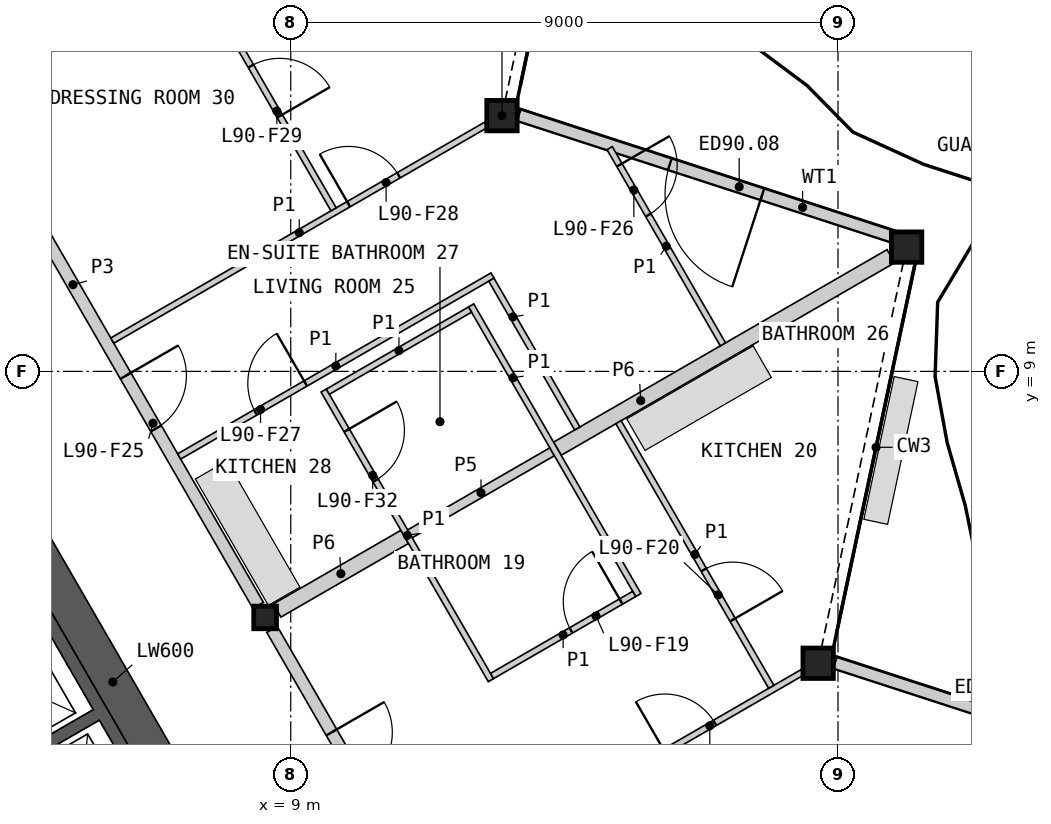
"""IFC4 building model, lengths in metres.
Left out: names, types, materials, properties, quantities, classifications, styles, units other than length and angle.
Written with IfcOpenShell. Run it as: python <this file> out.ifc"""

import sys

from ifc_helpers import new_model, si_unit, direction, frame, frame_2d, origin, origin_2d, place, context, subcontext, project, spatial, polyline, rectangle, hollow_rectangle, i_section, outline, extrude, element, fill, save


model = new_model("IFC4")
c1 = context("Model", 3, precision=1e-05, world=origin(), true_north=direction((0.0, 1.0)))
c2 = subcontext(c1, "Body", "Model", "MODEL_VIEW")
j1 = project(units=[si_unit("LENGTHUNIT", "METRE"), si_unit("PLANEANGLEUNIT", "RADIAN")], contexts=[c1])
p1 = place(None, origin())
s1 = spatial("IfcSite", under=j1, at=p1, CompositionType="ELEMENT")
p2 = place(p1, origin())
s2 = spatial("IfcBuilding", under=s1, at=p2, CompositionType="ELEMENT")
p3 = place(p2, frame((0.0, 0.0, 395.0)))
s3 = spatial("IfcBuildingStorey", under=s2, at=p3, CompositionType="ELEMENT", Elevation=395.0)
for number, where, z_axis, x_axis in (
    (1, (17.674, 4.199, 0.0), (0.0, 0.0, 1.0), (1.0, 0.0, 0.0)),
    (2, (19.129, 11.044, 0.0), (0.0, 0.0, 1.0), (1.0, 0.0, 0.0)),
    (3, (12.474, 13.206, 0.0), (0.0, 0.0, 1.0), (1.0, 0.0, 0.0)),
):
    element("IfcColumn", number, at=place(p3, frame(where, z_axis=z_axis, x_axis=x_axis)), inside=s3, PredefinedType="COLUMN", context=c2, shape_type="SweptSolid", body=[
        extrude(hollow_rectangle(XDim=0.5, YDim=0.5, WallThickness=0.03, at=origin_2d()), origin(), (0.0, 0.0, 1.0), 3.4),
    ])
p4 = place(p3, frame((8.578, 4.953, 0.0), z_axis=(0.0, 0.0, 1.0), x_axis=(1.0, 0.0, 0.0)))
e4 = element("IfcColumn", 4, at=p4, inside=s3, PredefinedType="COLUMN", context=c2, shape_type="SweptSolid", body=[
    extrude(i_section(OverallWidth=0.374, OverallDepth=0.372, WebThickness=0.016, FlangeThickness=0.026, at=origin_2d()), origin(), (0.0, 0.0, 1.0), 3.4),
])
p5 = place(p3, frame((24.174, 2.185, 0.0), z_axis=(0.0, 0.0, 1.0), x_axis=(-0.951061473407, 0.309001737536, 0.0)))
e5 = element("IfcWall", 5, at=p5, inside=s3, PredefinedType="SOLIDWALL", context=c2, shape_type="SweptSolid", body=[
    extrude(rectangle(XDim=6.546, YDim=0.2, at=frame_2d((3.273, 0.0))), origin(), (0.0, 0.0, 1.0), 2.634),
])
p6 = place(p5, frame((2.333, 0.0, 0.0)))
e6 = element("IfcOpeningElement", 6, at=p6, cuts=e5, PredefinedType="OPENING", context=c2, shape_type="SweptSolid", body=[
    extrude(rectangle(XDim=1.6, YDim=2.25, at=frame_2d((0.8, 1.125))), frame((0.0, 0.11, 0.0), z_axis=(0.0, -1.0, 0.0), x_axis=(1.0, 0.0, 0.0)), (0.0, 0.0, 1.0), 0.22),
])
p7 = place(p3, frame((18.974, 11.191, 0.0), z_axis=(0.0, 0.0, 1.0), x_axis=(-0.951057912068, 0.309012698595, 0.0)))
e7 = element("IfcWall", 7, at=p7, inside=s3, PredefinedType="SOLIDWALL", context=c2, shape_type="SweptSolid", body=[
    extrude(rectangle(XDim=6.546, YDim=0.2, at=frame_2d((3.273, 0.0))), origin(), (0.0, 0.0, 1.0), 2.634),
])
p8 = place(p7, frame((2.333, 0.0, 0.0)))
e8 = element("IfcOpeningElement", 8, at=p8, cuts=e7, PredefinedType="OPENING", context=c2, shape_type="SweptSolid", body=[
    extrude(rectangle(XDim=1.6, YDim=2.25, at=frame_2d((0.8, 1.125))), frame((0.0, 0.11, 0.0), z_axis=(0.0, -1.0, 0.0), x_axis=(1.0, 0.0, 0.0)), (0.0, 0.0, 1.0), 0.22),
])
p9 = place(p3, origin())
e9 = element("IfcWall", 9, at=p9, inside=s3, PredefinedType="SHEAR", context=c2, shape_type="SweptSolid", body=[
    extrude(outline(polyline([(1.561, 6.097), (3.731, 7.35), (8.231, -0.444), (6.061, -1.697), (5.96, -1.524), (7.952, -0.374), (6.952, 1.358), (4.96, 0.208), (4.861, 0.381), (6.852, 1.531), (5.852, 3.263), (3.861, 2.113), (3.76, 2.287), (5.752, 3.437), (4.752, 5.169), (2.76, 4.019), (2.66, 4.192), (4.652, 5.342), (3.652, 7.074), (1.66, 5.924), (1.561, 6.097)])), origin(), (0.0, 0.0, 1.0), 3.1),
])
p10 = place(p3, frame((5.817, -1.476, 0.0), z_axis=(0.0, 0.0, 1.0), x_axis=(-0.500002616675, 0.866023893041, 0.0)))
e10 = element("IfcWall", 10, at=p10, inside=s3, PredefinedType="SOLIDWALL", context=c2, shape_type="SweptSolid", body=[
    extrude(rectangle(XDim=8.373, YDim=0.2, at=frame_2d((4.187, 0.0))), origin(), (0.0, 0.0, 1.0), 3.1),
])
p11 = place(p10, frame((0.337, 0.0, 0.0)))
e11 = element("IfcOpeningElement", 11, at=p11, cuts=e10, PredefinedType="OPENING", context=c2, shape_type="SweptSolid", body=[
    extrude(rectangle(XDim=1.1, YDim=2.1, at=frame_2d((0.55, 1.05))), frame((0.0, 0.11, 0.0), z_axis=(0.0, -1.0, 0.0), x_axis=(1.0, 0.0, 0.0)), (0.0, 0.0, 1.0), 0.22),
])
p12 = place(p10, frame((2.537, 0.0, 0.0)))
e12 = element("IfcOpeningElement", 12, at=p12, cuts=e10, PredefinedType="OPENING", context=c2, shape_type="SweptSolid", body=[
    extrude(rectangle(XDim=1.1, YDim=2.1, at=frame_2d((0.55, 1.05))), frame((0.0, 0.11, 0.0), z_axis=(0.0, -1.0, 0.0), x_axis=(1.0, 0.0, 0.0)), (0.0, 0.0, 1.0), 0.22),
])
p13 = place(p10, frame((4.737, 0.0, 0.0)))
e13 = element("IfcOpeningElement", 13, at=p13, cuts=e10, PredefinedType="OPENING", context=c2, shape_type="SweptSolid", body=[
    extrude(rectangle(XDim=1.1, YDim=2.1, at=frame_2d((0.55, 1.05))), frame((0.0, 0.11, 0.0), z_axis=(0.0, -1.0, 0.0), x_axis=(1.0, 0.0, 0.0)), (0.0, 0.0, 1.0), 0.22),
])
p14 = place(p10, frame((7.037, 0.0, 0.0)))
e14 = element("IfcOpeningElement", 14, at=p14, cuts=e10, PredefinedType="OPENING", context=c2, shape_type="SweptSolid", body=[
    extrude(rectangle(XDim=0.9, YDim=2.1, at=frame_2d((0.45, 1.05))), frame((0.0, 0.11, 0.0), z_axis=(0.0, -1.0, 0.0), x_axis=(1.0, 0.0, 0.0)), (0.0, 0.0, 1.0), 0.22),
])
p15 = place(p3, frame((8.686, -0.634, 0.0), z_axis=(0.0, 0.0, 1.0), x_axis=(-0.50001836461, 0.866014800712, 0.0)))
e15 = element("IfcWall", 15, at=p15, inside=s3, PredefinedType="SHEAR", context=c2, shape_type="SweptSolid", body=[
    extrude(rectangle(XDim=10.451, YDim=0.6, at=frame_2d((5.225, 0.0))), origin(), (0.0, 0.0, 1.0), 3.1),
])
p16 = place(p3, frame((4.403, 12.185, 0.0), z_axis=(0.0, 0.0, 1.0), x_axis=(0.499992155518, -0.866029932751, 0.0)))
e16 = element("IfcWall", 16, at=p16, inside=s3, PredefinedType="PARTITIONING", context=c2, shape_type="SweptSolid", body=[
    extrude(rectangle(XDim=8.123, YDim=0.2, at=frame_2d((4.062, 0.0))), origin(), (0.0, 0.0, 1.0), 3.1),
])
p17 = place(p16, frame((3.762, 0.0, 0.0)))
e17 = element("IfcOpeningElement", 17, at=p17, cuts=e16, PredefinedType="OPENING", context=c2, shape_type="SweptSolid", body=[
    extrude(rectangle(XDim=1.0, YDim=2.1, at=frame_2d((0.5, 1.05))), frame((0.0, 0.11, 0.0), z_axis=(0.0, -1.0, 0.0), x_axis=(1.0, 0.0, 0.0)), (0.0, 0.0, 1.0), 0.22),
])
p18 = place(p3, frame((8.692, 4.756, 0.0), z_axis=(0.0, 0.0, 1.0), x_axis=(0.500001682468, -0.866024432409, 0.0)))
e18 = element("IfcWall", 18, at=p18, inside=s3, PredefinedType="PARTITIONING", context=c2, shape_type="SweptSolid", body=[
    extrude(rectangle(XDim=8.124, YDim=0.2, at=frame_2d((4.062, 0.0))), origin(), (0.0, 0.0, 1.0), 3.1),
])
p19 = place(p18, frame((1.956, 0.0, 0.0)))
e19 = element("IfcOpeningElement", 19, at=p19, cuts=e18, PredefinedType="OPENING", context=c2, shape_type="SweptSolid", body=[
    extrude(rectangle(XDim=1.0, YDim=2.1, at=frame_2d((0.5, 1.05))), frame((0.0, 0.11, 0.0), z_axis=(0.0, -1.0, 0.0), x_axis=(1.0, 0.0, 0.0)), (0.0, 0.0, 1.0), 0.22),
])
p20 = place(p3, frame((13.385, 7.728, 0.0), z_axis=(0.0, 0.0, 1.0), x_axis=(0.866023139795, 0.500003921324, 0.0)))
e20 = element("IfcWall", 20, at=p20, inside=s3, PredefinedType="PARTITIONING", context=c2, shape_type="SweptSolid", body=[
    extrude(rectangle(XDim=6.332, YDim=0.25, at=frame_2d((3.166, 0.0))), origin(), (0.0, 0.0, 1.0), 2.33),
])
p21 = place(p3, frame((8.775, 5.066, 0.0), z_axis=(0.0, 0.0, 1.0), x_axis=(0.865989219354, 0.500062668036, 0.0)))
e21 = element("IfcWall", 21, at=p21, inside=s3, PredefinedType="PARTITIONING", context=c2, shape_type="SweptSolid", body=[
    extrude(rectangle(XDim=2.423, YDim=0.25, at=frame_2d((1.211, 0.0))), origin(), (0.0, 0.0, 1.0), 2.33),
])
p22 = place(p3, frame((10.96, 6.328, 0.0), z_axis=(0.0, 0.0, 1.0), x_axis=(0.866059108428, 0.4999416173, 0.0)))
e22 = element("IfcWall", 22, at=p22, inside=s3, PredefinedType="PLUMBINGWALL", context=c2, shape_type="SweptSolid", body=[
    extrude(rectangle(XDim=2.7, YDim=0.15, at=frame_2d((1.35, 0.0))), origin(), (0.0, 0.0, 1.0), 2.33),
])
p23 = place(p3, frame((3.465, 14.01, 0.0), z_axis=(0.0, 0.0, 1.0), x_axis=(0.866032376801, 0.499987922186, 0.0)))
e23 = element("IfcWall", 23, at=p23, inside=s3, PredefinedType="PARTITIONING", context=c2, shape_type="SweptSolid", body=[
    extrude(rectangle(XDim=11.782, YDim=0.1, at=frame_2d((5.891, 0.0))), origin(), (0.0, 0.0, 1.0), 2.33),
])
p24 = place(p23, frame((6.168, 0.0, 0.0)))
e24 = element("IfcOpeningElement", 24, at=p24, cuts=e23, PredefinedType="OPENING", context=c2, shape_type="SweptSolid", body=[
    extrude(rectangle(XDim=0.95, YDim=2.1, at=frame_2d((0.475, 1.05))), frame((0.0, 0.06, 0.0), z_axis=(0.0, -1.0, 0.0), x_axis=(1.0, 0.0, 0.0)), (0.0, 0.0, 1.0), 0.12),
])
p25 = place(p3, frame((6.065, 9.506, 0.0), z_axis=(0.0, 0.0, 1.0), x_axis=(0.866018949465, 0.500011179042, 0.0)))
e25 = element("IfcWall", 25, at=p25, inside=s3, PredefinedType="PARTITIONING", context=c2, shape_type="SweptSolid", body=[
    extrude(rectangle(XDim=7.1, YDim=0.1, at=frame_2d((3.55, 0.0))), origin(), (0.0, 0.0, 1.0), 2.33),
])
p26 = place(p25, frame((4.488, 0.0, 0.0)))
e26 = element("IfcOpeningElement", 26, at=p26, cuts=e25, PredefinedType="OPENING", context=c2, shape_type="SweptSolid", body=[
    extrude(rectangle(XDim=0.95, YDim=2.1, at=frame_2d((0.475, 1.05))), frame((0.0, 0.06, 0.0), z_axis=(0.0, -1.0, 0.0), x_axis=(1.0, 0.0, 0.0)), (0.0, 0.0, 1.0), 0.12),
])
p27 = place(p3, frame((11.265, 0.5, 0.0), z_axis=(0.0, 0.0, 1.0), x_axis=(0.866033839264, 0.499985389037, 0.0)))
e27 = element("IfcWall", 27, at=p27, inside=s3, PredefinedType="PARTITIONING", context=c2, shape_type="SweptSolid", body=[
    extrude(rectangle(XDim=7.1, YDim=0.1, at=frame_2d((3.55, 0.0))), origin(), (0.0, 0.0, 1.0), 2.33),
])
p28 = place(p27, frame((4.488, 0.0, 0.0)))
e28 = element("IfcOpeningElement", 28, at=p28, cuts=e27, PredefinedType="OPENING", context=c2, shape_type="SweptSolid", body=[
    extrude(rectangle(XDim=0.95, YDim=2.1, at=frame_2d((0.475, 1.05))), frame((0.0, 0.06, 0.0), z_axis=(0.0, -1.0, 0.0), x_axis=(1.0, 0.0, 0.0)), (0.0, 0.0, 1.0), 0.12),
])
p29 = place(p3, frame((7.165, 7.601, 0.0), z_axis=(0.0, 0.0, 1.0), x_axis=(0.866017493347, 0.500013701029, 0.0)))
e29 = element("IfcWall", 29, at=p29, inside=s3, PredefinedType="PARTITIONING", context=c2, shape_type="SweptSolid", body=[
    extrude(rectangle(XDim=5.95, YDim=0.1, at=frame_2d((2.975, 0.0))), origin(), (0.0, 0.0, 1.0), 2.33),
])
p30 = place(p29, frame((1.45, 0.0, 0.0)))
e30 = element("IfcOpeningElement", 30, at=p30, cuts=e29, PredefinedType="OPENING", context=c2, shape_type="SweptSolid", body=[
    extrude(rectangle(XDim=0.95, YDim=2.1, at=frame_2d((0.475, 1.05))), frame((0.0, 0.06, 0.0), z_axis=(0.0, -1.0, 0.0), x_axis=(1.0, 0.0, 0.0)), (0.0, 0.0, 1.0), 0.12),
])
p31 = place(p3, frame((11.967, 10.084, 0.0), z_axis=(0.0, 0.0, 1.0), x_axis=(0.500015767406, -0.866016300277, 0.0)))
e31 = element("IfcWall", 31, at=p31, inside=s3, PredefinedType="PARTITIONING", context=c2, shape_type="SweptSolid", body=[
    extrude(rectangle(XDim=5.5, YDim=0.1, at=frame_2d((2.75, 0.0))), origin(), (0.0, 0.0, 1.0), 2.33),
])
p32 = place(p3, frame((9.542, 8.684, 0.0), z_axis=(0.0, 0.0, 1.0), x_axis=(0.499996545922, -0.866027397988, 0.0)))
e32 = element("IfcWall", 32, at=p32, inside=s3, PredefinedType="PARTITIONING", context=c2, shape_type="SweptSolid", body=[
    extrude(rectangle(XDim=5.5, YDim=0.1, at=frame_2d((2.75, 0.0))), origin(), (0.0, 0.0, 1.0), 2.33),
])
p33 = place(p32, frame((0.756, 0.0, 0.0)))
e33 = element("IfcOpeningElement", 33, at=p33, cuts=e32, PredefinedType="OPENING", context=c2, shape_type="SweptSolid", body=[
    extrude(rectangle(XDim=0.95, YDim=2.1, at=frame_2d((0.475, 1.05))), frame((0.0, 0.06, 0.0), z_axis=(0.0, -1.0, 0.0), x_axis=(1.0, 0.0, 0.0)), (0.0, 0.0, 1.0), 0.12),
])
p34 = place(p3, frame((14.39, 8.164, 0.0), z_axis=(0.0, 0.0, 1.0), x_axis=(0.499990214365, -0.86603105345, 0.0)))
e34 = element("IfcWall", 34, at=p34, inside=s3, PredefinedType="PARTITIONING", context=c2, shape_type="SweptSolid", body=[
    extrude(rectangle(XDim=5.025, YDim=0.1, at=frame_2d((2.512, 0.0))), origin(), (0.0, 0.0, 1.0), 2.33),
])
p35 = place(p34, frame((2.803, 0.0, 0.0)))
e35 = element("IfcOpeningElement", 35, at=p35, cuts=e34, PredefinedType="OPENING", context=c2, shape_type="SweptSolid", body=[
    extrude(rectangle(XDim=0.95, YDim=2.1, at=frame_2d((0.475, 1.05))), frame((0.0, 0.06, 0.0), z_axis=(0.0, -1.0, 0.0), x_axis=(1.0, 0.0, 0.0)), (0.0, 0.0, 1.0), 0.12),
])
p36 = place(p3, frame((7.154, 16.082, 0.0), z_axis=(0.0, 0.0, 1.0), x_axis=(0.499984882974, -0.866034131428, 0.0)))
e36 = element("IfcWall", 36, at=p36, inside=s3, PredefinedType="PARTITIONING", context=c2, shape_type="SweptSolid", body=[
    extrude(rectangle(XDim=5.1, YDim=0.1, at=frame_2d((2.55, 0.0))), origin(), (0.0, 0.0, 1.0), 2.33),
])
p37 = place(p36, frame((2.379, 0.0, 0.0)))
e37 = element("IfcOpeningElement", 37, at=p37, cuts=e36, PredefinedType="OPENING", context=c2, shape_type="SweptSolid", body=[
    extrude(rectangle(XDim=0.95, YDim=2.1, at=frame_2d((0.475, 1.05))), frame((0.0, 0.06, 0.0), z_axis=(0.0, -1.0, 0.0), x_axis=(1.0, 0.0, 0.0)), (0.0, 0.0, 1.0), 0.12),
])
p38 = place(p3, frame((14.244, 12.672, 0.0), z_axis=(0.0, 0.0, 1.0), x_axis=(0.500021098671, -0.866013222118, 0.0)))
e38 = element("IfcWall", 38, at=p38, inside=s3, PredefinedType="PARTITIONING", context=c2, shape_type="SweptSolid", body=[
    extrude(rectangle(XDim=3.727, YDim=0.1, at=frame_2d((1.863, 0.0))), origin(), (0.0, 0.0, 1.0), 2.33),
])
p39 = place(p38, frame((0.321, 0.0, 0.0)))
e39 = element("IfcOpeningElement", 39, at=p39, cuts=e38, PredefinedType="OPENING", context=c2, shape_type="SweptSolid", body=[
    extrude(rectangle(XDim=0.95, YDim=2.1, at=frame_2d((0.475, 1.05))), frame((0.0, 0.06, 0.0), z_axis=(0.0, -1.0, 0.0), x_axis=(1.0, 0.0, 0.0)), (0.0, 0.0, 1.0), 0.12),
])
p40 = place(p3, frame((12.3, 10.508, 0.0), z_axis=(0.0, 0.0, 1.0), x_axis=(0.500024172624, -0.866011447264, 0.0)))
e40 = element("IfcWall", 40, at=p40, inside=s3, PredefinedType="PARTITIONING", context=c2, shape_type="SweptSolid", body=[
    extrude(rectangle(XDim=2.825, YDim=0.1, at=frame_2d((1.413, 0.0))), origin(), (0.0, 0.0, 1.0), 2.33),
])
p41 = place(p3, frame((9.61, 8.666, 0.0), z_axis=(0.0, 0.0, 1.0), x_axis=(0.86599734893, 0.500048589285, 0.0)))
e41 = element("IfcWall", 41, at=p41, inside=s3, PredefinedType="PARTITIONING", context=c2, shape_type="SweptSolid", body=[
    extrude(rectangle(XDim=2.7, YDim=0.1, at=frame_2d((1.35, 0.0))), origin(), (0.0, 0.0, 1.0), 2.33),
])
p42 = place(p3, frame((12.31, 3.99, 0.0), z_axis=(0.0, 0.0, 1.0), x_axis=(0.86599734893, 0.500048589285, 0.0)))
e42 = element("IfcWall", 42, at=p42, inside=s3, PredefinedType="PARTITIONING", context=c2, shape_type="SweptSolid", body=[
    extrude(rectangle(XDim=2.7, YDim=0.1, at=frame_2d((1.35, 0.0))), origin(), (0.0, 0.0, 1.0), 2.33),
])
p43 = place(p42, frame((1.5, 0.0, 0.0)))
e43 = element("IfcOpeningElement", 43, at=p43, cuts=e42, PredefinedType="OPENING", context=c2, shape_type="SweptSolid", body=[
    extrude(rectangle(XDim=0.95, YDim=2.1, at=frame_2d((0.475, 1.05))), frame((0.0, 0.06, 0.0), z_axis=(0.0, -1.0, 0.0), x_axis=(1.0, 0.0, 0.0)), (0.0, 0.0, 1.0), 0.12),
])
p44 = place(p8, origin())
e44 = element("IfcDoor", 44, at=p44, inside=s3, OperationType="DOUBLE_DOOR_SINGLE_SWING", PredefinedType="DOOR", context=c2, shape_type="SweptSolid", body=[
    extrude(rectangle(XDim=1.6, YDim=2.25, at=frame_2d((0.8, 1.125))), frame((0.0, 0.025, 0.0), z_axis=(0.0, -1.0, 0.0), x_axis=(1.0, 0.0, 0.0)), (0.0, 0.0, 1.0), 0.05),
])
fill(e8, e44)
p45 = place(p19, origin())
e45 = element("IfcDoor", 45, at=p45, inside=s3, OperationType="SINGLE_SWING_LEFT", PredefinedType="DOOR", context=c2, shape_type="SweptSolid", body=[
    extrude(rectangle(XDim=1.0, YDim=2.1, at=frame_2d((0.5, 1.05))), frame((0.0, 0.025, 0.0), z_axis=(0.0, -1.0, 0.0), x_axis=(1.0, 0.0, 0.0)), (0.0, 0.0, 1.0), 0.05),
])
fill(e19, e45)
p46 = place(p43, origin())
e46 = element("IfcDoor", 46, at=p46, inside=s3, OperationType="SINGLE_SWING_RIGHT", PredefinedType="DOOR", context=c2, shape_type="SweptSolid", body=[
    extrude(rectangle(XDim=0.95, YDim=2.1, at=frame_2d((0.475, 1.05))), frame((0.0, 0.025, 0.0), z_axis=(0.0, -1.0, 0.0), x_axis=(1.0, 0.0, 0.0)), (0.0, 0.0, 1.0), 0.05),
])
fill(e43, e46)
p47 = place(p35, origin())
e47 = element("IfcDoor", 47, at=p47, inside=s3, OperationType="SINGLE_SWING_RIGHT", PredefinedType="DOOR", context=c2, shape_type="SweptSolid", body=[
    extrude(rectangle(XDim=0.95, YDim=2.1, at=frame_2d((0.475, 1.05))), frame((0.0, 0.025, 0.0), z_axis=(0.0, -1.0, 0.0), x_axis=(1.0, 0.0, 0.0)), (0.0, 0.0, 1.0), 0.05),
])
fill(e35, e47)
p48 = place(p28, origin())
e48 = element("IfcDoor", 48, at=p48, inside=s3, OperationType="SINGLE_SWING_LEFT", PredefinedType="DOOR", context=c2, shape_type="SweptSolid", body=[
    extrude(rectangle(XDim=0.95, YDim=2.1, at=frame_2d((0.475, 1.05))), frame((0.0, 0.025, 0.0), z_axis=(0.0, -1.0, 0.0), x_axis=(1.0, 0.0, 0.0)), (0.0, 0.0, 1.0), 0.05),
])
fill(e28, e48)
p49 = place(p17, origin())
e49 = element("IfcDoor", 49, at=p49, inside=s3, OperationType="SINGLE_SWING_LEFT", PredefinedType="DOOR", context=c2, shape_type="SweptSolid", body=[
    extrude(rectangle(XDim=1.0, YDim=2.1, at=frame_2d((0.5, 1.05))), frame((0.0, 0.025, 0.0), z_axis=(0.0, -1.0, 0.0), x_axis=(1.0, 0.0, 0.0)), (0.0, 0.0, 1.0), 0.05),
])
fill(e17, e49)
p50 = place(p39, origin())
e50 = element("IfcDoor", 50, at=p50, inside=s3, OperationType="SINGLE_SWING_LEFT", PredefinedType="DOOR", context=c2, shape_type="SweptSolid", body=[
    extrude(rectangle(XDim=0.95, YDim=2.1, at=frame_2d((0.475, 1.05))), frame((0.0, 0.025, 0.0), z_axis=(0.0, -1.0, 0.0), x_axis=(1.0, 0.0, 0.0)), (0.0, 0.0, 1.0), 0.05),
])
fill(e39, e50)
p51 = place(p30, origin())
e51 = element("IfcDoor", 51, at=p51, inside=s3, OperationType="SINGLE_SWING_RIGHT", PredefinedType="DOOR", context=c2, shape_type="SweptSolid", body=[
    extrude(rectangle(XDim=0.95, YDim=2.1, at=frame_2d((0.475, 1.05))), frame((0.0, 0.025, 0.0), z_axis=(0.0, -1.0, 0.0), x_axis=(1.0, 0.0, 0.0)), (0.0, 0.0, 1.0), 0.05),
])
fill(e30, e51)
p52 = place(p26, origin())
e52 = element("IfcDoor", 52, at=p52, inside=s3, OperationType="SINGLE_SWING_LEFT", PredefinedType="DOOR", context=c2, shape_type="SweptSolid", body=[
    extrude(rectangle(XDim=0.95, YDim=2.1, at=frame_2d((0.475, 1.05))), frame((0.0, 0.025, 0.0), z_axis=(0.0, -1.0, 0.0), x_axis=(1.0, 0.0, 0.0)), (0.0, 0.0, 1.0), 0.05),
])
fill(e26, e52)
p53 = place(p37, origin())
e53 = element("IfcDoor", 53, at=p53, inside=s3, OperationType="SINGLE_SWING_RIGHT", PredefinedType="DOOR", context=c2, shape_type="SweptSolid", body=[
    extrude(rectangle(XDim=0.95, YDim=2.1, at=frame_2d((0.475, 1.05))), frame((0.0, 0.025, 0.0), z_axis=(0.0, -1.0, 0.0), x_axis=(1.0, 0.0, 0.0)), (0.0, 0.0, 1.0), 0.05),
])
fill(e37, e53)
p54 = place(p33, origin())
e54 = element("IfcDoor", 54, at=p54, inside=s3, OperationType="SINGLE_SWING_LEFT", PredefinedType="DOOR", context=c2, shape_type="SweptSolid", body=[
    extrude(rectangle(XDim=0.95, YDim=2.1, at=frame_2d((0.475, 1.05))), frame((0.0, 0.025, 0.0), z_axis=(0.0, -1.0, 0.0), x_axis=(1.0, 0.0, 0.0)), (0.0, 0.0, 1.0), 0.05),
])
fill(e33, e54)
save(model, sys.argv[1])
